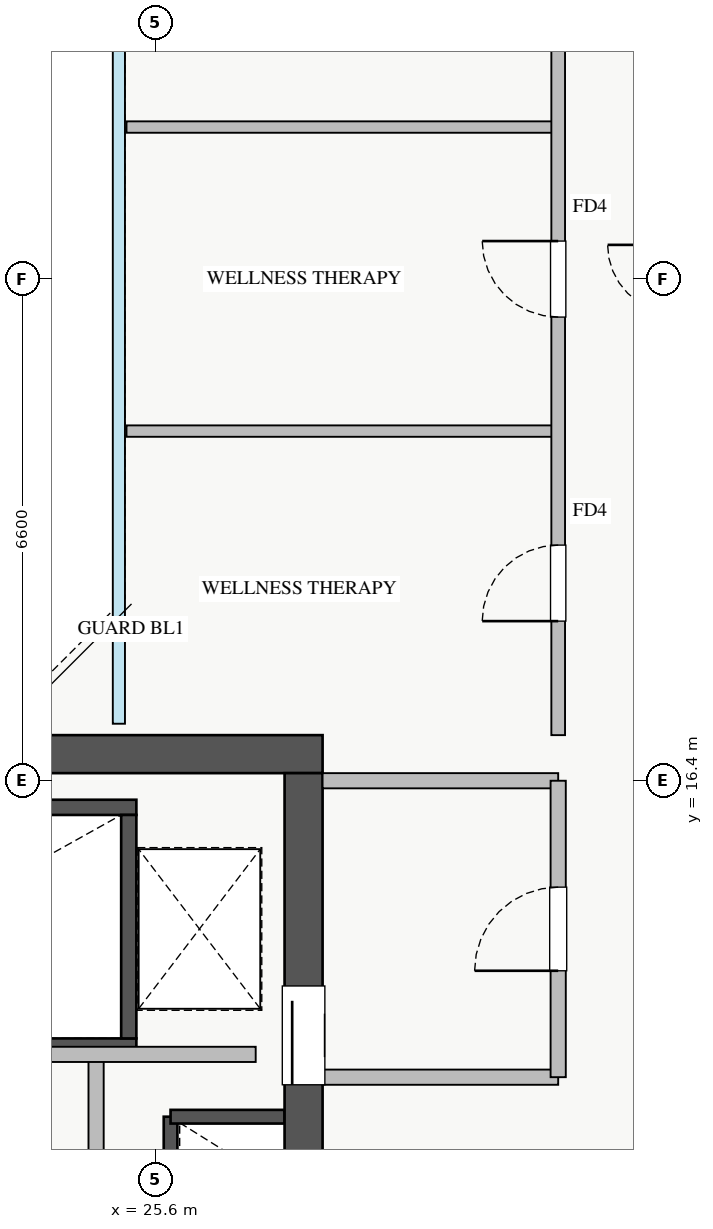
"""IFC4 building model, lengths in metres.
Left out: names, types, materials, properties, quantities, classifications, styles, units other than length and angle.
Written with IfcOpenShell. Run it as: python <this file> out.ifc"""

import sys

from ifc_helpers import new_model, si_unit, direction, frame, frame_2d, origin, place, context, subcontext, project, spatial, rectangle, extrude, source, transform, mapped, element, fill, save


model = new_model("IFC4")
c1 = context("Model", 3, precision=1e-05, world=origin(), true_north=direction((0.0, 1.0)))
c2 = subcontext(c1, "Body", "Model", "MODEL_VIEW")
j1 = project(units=[si_unit("LENGTHUNIT", "METRE"), si_unit("PLANEANGLEUNIT", "RADIAN")], contexts=[c1])
p1 = place(None, origin())
s1 = spatial("IfcSite", under=j1, at=p1, CompositionType="ELEMENT")
p2 = place(p1, origin())
s2 = spatial("IfcBuilding", under=s1, at=p2, CompositionType="ELEMENT")
p3 = place(p2, frame((0.0, 0.0, 223.0)))
s3 = spatial("IfcBuildingStorey", under=s2, at=p3, CompositionType="ELEMENT", Elevation=223.0)
p4 = place(p3, frame((25.8, 10.92, 0.0), z_axis=(0.0, 0.0, 1.0), x_axis=(0.0, 1.0, 0.0)))
e1 = element("IfcWall", 1, at=p4, inside=s3, PredefinedType="SHEAR", context=c2, shape_type="SweptSolid", body=[
    extrude(rectangle(XDim=1.06, YDim=0.18, at=frame_2d((0.53, 0.0))), origin(), (0.0, 0.0, 1.0), 3.07),
])
p5 = place(p3, frame((25.8, 11.98, 0.0), z_axis=(0.0, 0.0, 1.0), x_axis=(1.0, 0.0, 0.0)))
e2 = element("IfcWall", 2, at=p5, inside=s3, PredefinedType="SHEAR", context=c2, shape_type="SweptSolid", body=[
    extrude(rectangle(XDim=1.5, YDim=0.18, at=frame_2d((0.75, 0.0))), origin(), (0.0, 0.0, 1.0), 3.07),
])
p6 = place(p3, frame((18.2, 12.91, 0.0), z_axis=(0.0, 0.0, 1.0), x_axis=(1.0, 0.0, 0.0)))
e3 = element("IfcWall", 3, at=p6, inside=s3, PredefinedType="SHEAR", context=c2, shape_type="SweptSolid", body=[
    extrude(rectangle(XDim=7.15, YDim=0.2, at=frame_2d((3.575, 0.0))), origin(), (0.0, 0.0, 1.0), 3.25),
])
p7 = place(p6, frame((0.35, 0.0, 0.0)))
e4 = element("IfcOpeningElement", 4, at=p7, cuts=e3, PredefinedType="OPENING", context=c2, shape_type="SweptSolid", body=[
    extrude(rectangle(XDim=1.1, YDim=2.05, at=frame_2d((0.55, 1.025))), frame((0.0, 0.11, 0.0), z_axis=(0.0, -1.0, 0.0), x_axis=(1.0, 0.0, 0.0)), (0.0, 0.0, 1.0), 0.22),
])
p8 = place(p3, frame((18.2, 16.05, 0.0), z_axis=(0.0, 0.0, 1.0), x_axis=(1.0, 0.0, 0.0)))
e5 = element("IfcWall", 5, at=p8, inside=s3, PredefinedType="SHEAR", context=c2, shape_type="SweptSolid", body=[
    extrude(rectangle(XDim=7.15, YDim=0.2, at=frame_2d((3.575, 0.0))), origin(), (0.0, 0.0, 1.0), 3.25),
])
p9 = place(p3, frame((25.25, 13.01, 0.0), z_axis=(0.0, 0.0, 1.0), x_axis=(0.0, 1.0, 0.0)))
e6 = element("IfcWall", 6, at=p9, inside=s3, PredefinedType="SHEAR", context=c2, shape_type="SweptSolid", body=[
    extrude(rectangle(XDim=2.94, YDim=0.2, at=frame_2d((1.47, 0.0))), origin(), (0.0, 0.0, 1.0), 3.25),
])
p10 = place(p3, frame((10.2, 16.75, 0.0), z_axis=(0.0, 0.0, 1.0), x_axis=(1.0, 0.0, 0.0)))
e7 = element("IfcWall", 7, at=p10, inside=s3, PredefinedType="SHEAR", context=c2, shape_type="SweptSolid", body=[
    extrude(rectangle(XDim=17.6, YDim=0.5, at=frame_2d((8.8, 0.0))), origin(), (0.0, 0.0, 1.0), 3.25),
])
p11 = place(p3, frame((27.55, 10.3, 0.0), z_axis=(0.0, 0.0, 1.0), x_axis=(0.0, 1.0, 0.0)))
e8 = element("IfcWall", 8, at=p11, inside=s3, PredefinedType="SHEAR", context=c2, shape_type="SweptSolid", body=[
    extrude(rectangle(XDim=6.2, YDim=0.5, at=frame_2d((3.1, 0.0))), origin(), (0.0, 0.0, 1.0), 3.25),
])
p12 = place(p11, frame((2.1, 0.0, 0.0)))
e9 = element("IfcOpeningElement", 9, at=p12, cuts=e8, PredefinedType="OPENING", context=c2, shape_type="SweptSolid", body=[
    extrude(rectangle(XDim=1.3, YDim=2.05, at=frame_2d((0.65, 1.025))), frame((0.0, 0.26, 0.0), z_axis=(0.0, -1.0, 0.0), x_axis=(1.0, 0.0, 0.0)), (0.0, 0.0, 1.0), 0.52),
])
p13 = place(p3, frame((27.8, 16.4, 0.0), z_axis=(0.0, 0.0, 1.0), x_axis=(1.0, 0.0, 0.0)))
e10 = element("IfcWall", 10, at=p13, inside=s3, PredefinedType="PARTITIONING", context=c2, shape_type="SweptSolid", body=[
    extrude(rectangle(XDim=3.1, YDim=0.2, at=frame_2d((1.55, 0.0))), origin(), (0.0, 0.0, 1.0), 3.07),
])
p14 = place(p3, frame((27.8, 12.5, 0.0), z_axis=(0.0, 0.0, 1.0), x_axis=(1.0, 0.0, 0.0)))
e11 = element("IfcWall", 11, at=p14, inside=s3, PredefinedType="PARTITIONING", context=c2, shape_type="SweptSolid", body=[
    extrude(rectangle(XDim=3.1, YDim=0.2, at=frame_2d((1.55, 0.0))), origin(), (0.0, 0.0, 1.0), 2.265),
])
p15 = place(p3, frame((30.9, 12.5, 0.0), z_axis=(0.0, 0.0, 1.0), x_axis=(0.0, 1.0, 0.0)))
e12 = element("IfcWall", 12, at=p15, inside=s3, PredefinedType="PARTITIONING", context=c2, shape_type="SweptSolid", body=[
    extrude(rectangle(XDim=3.9, YDim=0.2, at=frame_2d((1.95, 0.0))), origin(), (0.0, 0.0, 1.0), 3.07),
])
p16 = place(p15, frame((1.4, 0.0, 0.0)))
e13 = element("IfcOpeningElement", 13, at=p16, cuts=e12, PredefinedType="OPENING", context=c2, shape_type="SweptSolid", body=[
    extrude(rectangle(XDim=1.1, YDim=2.05, at=frame_2d((0.55, 1.025))), frame((0.0, 0.11, 0.0), z_axis=(0.0, -1.0, 0.0), x_axis=(1.0, 0.0, 0.0)), (0.0, 0.0, 1.0), 0.22),
])
p17 = place(p3, frame((24.82, 10.15, 0.0), z_axis=(0.0, 0.0, 1.0), x_axis=(0.0, 1.0, 0.0)))
e14 = element("IfcWall", 14, at=p17, inside=s3, PredefinedType="PARTITIONING", context=c2, shape_type="SweptSolid", body=[
    extrude(rectangle(XDim=2.65, YDim=0.2, at=frame_2d((1.325, 0.0))), origin(), (0.0, 0.0, 1.0), 3.07),
])
p18 = place(p3, frame((21.75, 12.8, 0.0), z_axis=(0.0, 0.0, 1.0), x_axis=(1.0, 0.0, 0.0)))
e15 = element("IfcWall", 15, at=p18, inside=s3, PredefinedType="PARTITIONING", context=c2, shape_type="SweptSolid", body=[
    extrude(rectangle(XDim=5.17, YDim=0.2, at=frame_2d((2.585, 0.0))), origin(), (0.0, 0.0, 1.0), 3.07),
])
for number, where, z_axis, x_axis in (
    (16, (25.22, 21.0, 0.0), (0.0, 0.0, 1.0), (1.0, 0.0, 0.0)),
    (17, (25.22, 25.0, 0.0), (0.0, 0.0, 1.0), (1.0, 0.0, 0.0)),
):
    element("IfcWall", number, at=place(p3, frame(where, z_axis=z_axis, x_axis=x_axis)), inside=s3, PredefinedType="PARTITIONING", context=c2, shape_type="SweptSolid", body=[
        extrude(rectangle(XDim=5.68, YDim=0.15, at=frame_2d((2.84, 0.0))), origin(), (0.0, 0.0, 1.0), 3.07),
    ])
p19 = place(p3, frame((30.9, 17.0, 0.0), z_axis=(0.0, 0.0, 1.0), x_axis=(0.0, 1.0, 0.0)))
e18 = element("IfcWall", 18, at=p19, inside=s3, PredefinedType="PARTITIONING", context=c2, shape_type="SweptSolid", body=[
    extrude(rectangle(XDim=12.0, YDim=0.18, at=frame_2d((6.0, 0.0))), origin(), (0.0, 0.0, 1.0), 3.07),
])
p20 = place(p19, frame((1.5, 0.0, 0.0)))
e19 = element("IfcOpeningElement", 19, at=p20, cuts=e18, PredefinedType="OPENING", context=c2, shape_type="SweptSolid", body=[
    extrude(rectangle(XDim=1.0, YDim=2.05, at=frame_2d((0.5, 1.025))), frame((0.0, 0.1, 0.0), z_axis=(0.0, -1.0, 0.0), x_axis=(1.0, 0.0, 0.0)), (0.0, 0.0, 1.0), 0.2),
])
p21 = place(p19, frame((5.5, 0.0, 0.0)))
e20 = element("IfcOpeningElement", 20, at=p21, cuts=e18, PredefinedType="OPENING", context=c2, shape_type="SweptSolid", body=[
    extrude(rectangle(XDim=1.0, YDim=2.05, at=frame_2d((0.5, 1.025))), frame((0.0, 0.1, 0.0), z_axis=(0.0, -1.0, 0.0), x_axis=(1.0, 0.0, 0.0)), (0.0, 0.0, 1.0), 0.2),
])
p22 = place(p19, frame((9.5, 0.0, 0.0)))
e21 = element("IfcOpeningElement", 21, at=p22, cuts=e18, PredefinedType="OPENING", context=c2, shape_type="SweptSolid", body=[
    extrude(rectangle(XDim=1.0, YDim=2.05, at=frame_2d((0.5, 1.025))), frame((0.0, 0.1, 0.0), z_axis=(0.0, -1.0, 0.0), x_axis=(1.0, 0.0, 0.0)), (0.0, 0.0, 1.0), 0.2),
])
m1 = source(origin(), c2, "Body", "SweptSolid", [
    extrude(rectangle(XDim=1.3, YDim=2.05, at=frame_2d((0.65, 1.025))), frame((0.0, 0.025, 0.0), z_axis=(0.0, -1.0, 0.0), x_axis=(1.0, 0.0, 0.0)), (0.0, 0.0, 1.0), 0.05),
])
p23 = place(p12, origin())
e22 = element("IfcDoor", 22, at=p23, inside=s3, OperationType="SLIDING_TO_RIGHT", PredefinedType="DOOR", context=c2, shape_type="MappedRepresentation", body=[
    mapped(m1, transform((0.0, 0.0, 0.0), x_axis=(1.0, 0.0, 0.0), y_axis=(0.0, 1.0, 0.0), z_axis=(0.0, 0.0, 1.0), scale=1.0)),
])
fill(e9, e22)
m2 = source(origin(), c2, "Body", "SweptSolid", [
    extrude(rectangle(XDim=1.1, YDim=2.05, at=frame_2d((0.55, 1.025))), frame((0.0, 0.025, 0.0), z_axis=(0.0, -1.0, 0.0), x_axis=(1.0, 0.0, 0.0)), (0.0, 0.0, 1.0), 0.05),
])
p24 = place(p16, origin())
e23 = element("IfcDoor", 23, at=p24, inside=s3, OperationType="SINGLE_SWING_LEFT", PredefinedType="DOOR", context=c2, shape_type="MappedRepresentation", body=[
    mapped(m2, transform((0.0, 0.0, 0.0), x_axis=(1.0, 0.0, 0.0), y_axis=(0.0, 1.0, 0.0), z_axis=(0.0, 0.0, 1.0), scale=1.0)),
])
fill(e13, e23)
m3 = source(origin(), c2, "Body", "SweptSolid", [
    extrude(rectangle(XDim=1.0, YDim=2.05, at=frame_2d((0.5, 1.025))), frame((0.0, 0.025, 0.0), z_axis=(0.0, -1.0, 0.0), x_axis=(1.0, 0.0, 0.0)), (0.0, 0.0, 1.0), 0.05),
])
p25 = place(p20, origin())
e24 = element("IfcDoor", 24, at=p25, inside=s3, OperationType="SINGLE_SWING_LEFT", PredefinedType="DOOR", context=c2, shape_type="MappedRepresentation", body=[
    mapped(m3, transform((0.0, 0.0, 0.0), x_axis=(1.0, 0.0, 0.0), y_axis=(0.0, 1.0, 0.0), z_axis=(0.0, 0.0, 1.0), scale=1.0)),
])
fill(e19, e24)
p26 = place(p21, origin())
e25 = element("IfcDoor", 25, at=p26, inside=s3, OperationType="SINGLE_SWING_RIGHT", PredefinedType="DOOR", context=c2, shape_type="MappedRepresentation", body=[
    mapped(m3, transform((0.0, 0.0, 0.0), x_axis=(1.0, 0.0, 0.0), y_axis=(0.0, 1.0, 0.0), z_axis=(0.0, 0.0, 1.0), scale=1.0)),
])
fill(e20, e25)
save(model, sys.argv[1])
